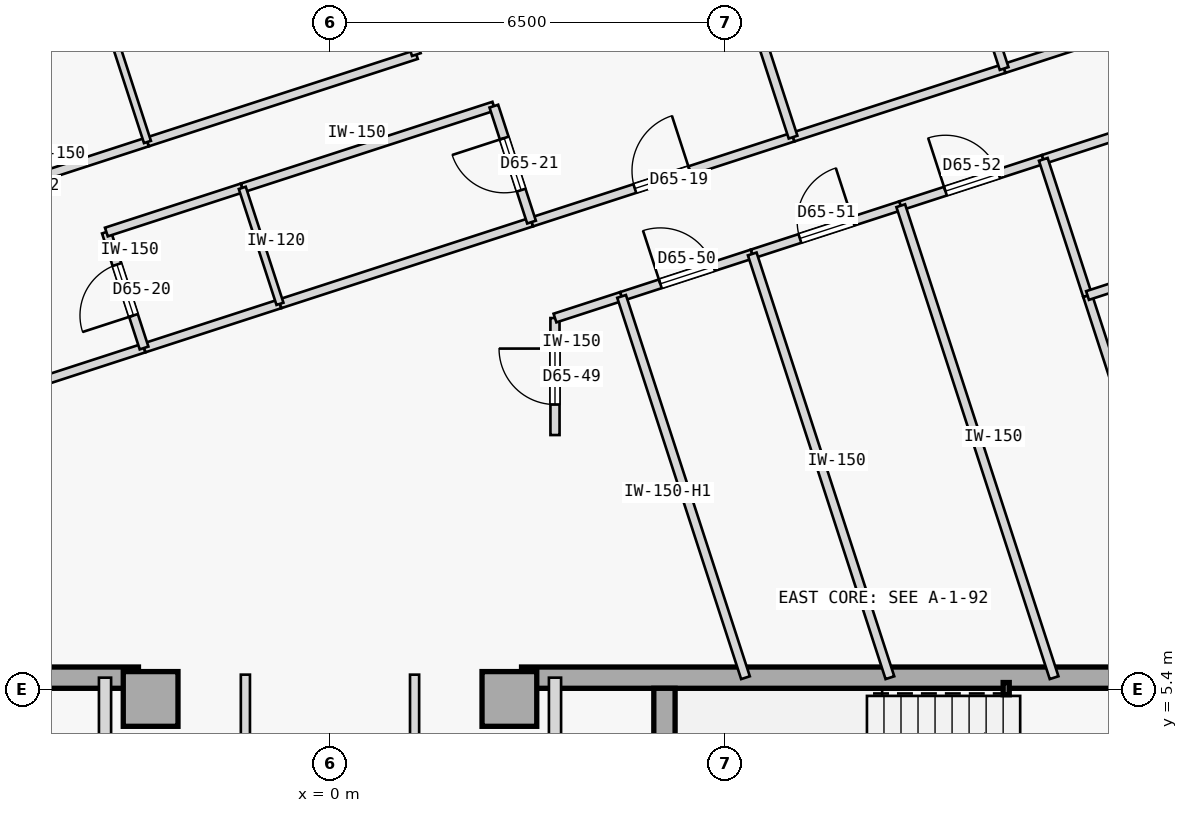
"""IFC4 building model, lengths in metres.
Left out: names, types, materials, properties, quantities, classifications, styles, units other than length and angle.
Written with IfcOpenShell. Run it as: python <this file> out.ifc"""

import sys

from ifc_helpers import new_model, si_unit, direction, frame, frame_2d, origin, origin_2d, place, context, subcontext, project, spatial, rectangle, hollow_rectangle, extrude, element, fill, save


model = new_model("IFC4")
c1 = context("Model", 3, precision=1e-05, world=origin(), true_north=direction((0.0, 1.0)))
c2 = subcontext(c1, "Body", "Model", "MODEL_VIEW")
j1 = project(units=[si_unit("LENGTHUNIT", "METRE"), si_unit("PLANEANGLEUNIT", "RADIAN")], contexts=[c1])
p1 = place(None, origin())
s1 = spatial("IfcSite", under=j1, at=p1, CompositionType="ELEMENT")
p2 = place(p1, origin())
s2 = spatial("IfcBuilding", under=s1, at=p2, CompositionType="ELEMENT")
p3 = place(p2, frame((0.0, 0.0, 244.4)))
s3 = spatial("IfcBuildingStorey", under=s2, at=p3, CompositionType="ELEMENT", Elevation=244.4)
for number, where, z_axis, x_axis in (
    (1, (-2.95, 5.25, 0.0), (0.0, 0.0, 1.0), (1.0, 0.0, 0.0)),
    (2, (2.95, 5.25, 0.0), (0.0, 0.0, 1.0), (1.0, 0.0, 0.0)),
):
    element("IfcColumn", number, at=place(p3, frame(where, z_axis=z_axis, x_axis=x_axis)), inside=s3, PredefinedType="COLUMN", context=c2, shape_type="SweptSolid", body=[
        extrude(rectangle(XDim=0.9, YDim=0.9, at=origin_2d()), origin(), (0.0, 0.0, 1.0), 3.35),
    ])
for number, where, z_axis, x_axis in (
    (3, (-14.56, 5.6, 0.0), (0.0, 0.0, 1.0), (1.0, 0.0, 0.0)),
    (4, (3.15, 5.6, 0.0), (0.0, 0.0, 1.0), (1.0, 0.0, 0.0)),
):
    element("IfcWall", number, at=place(p3, frame(where, z_axis=z_axis, x_axis=x_axis)), inside=s3, PredefinedType="SHEAR", context=c2, shape_type="SweptSolid", body=[
        extrude(rectangle(XDim=11.41, YDim=0.35, at=frame_2d((5.705, 0.0))), origin(), (0.0, 0.0, 1.0), 3.125),
    ])
p4 = place(p3, frame((5.5, 2.15, 0.0), z_axis=(0.0, 0.0, 1.0), x_axis=(0.0, 1.0, 0.0)))
e5 = element("IfcWall", 5, at=p4, inside=s3, PredefinedType="SHEAR", context=c2, shape_type="SweptSolid", body=[
    extrude(rectangle(XDim=3.275, YDim=0.35, at=frame_2d((1.638, 0.0))), origin(), (0.0, 0.0, 1.0), 3.125),
])
p5 = place(p3, frame((11.12, 5.42, 0.0), z_axis=(0.0, 0.0, 1.0), x_axis=(1.0, 0.0, 0.0)))
e6 = element("IfcColumn", 6, at=p5, inside=s3, PredefinedType="COLUMN", context=c2, shape_type="SweptSolid", body=[
    extrude(hollow_rectangle(XDim=0.1, YDim=0.2, WallThickness=0.008, at=origin_2d()), origin(), (0.0, 0.0, 1.0), 3.35),
])
p6 = place(p3, frame((-3.7, -1.15, 0.0), z_axis=(0.0, 0.0, 1.0), x_axis=(0.0, 1.0, 0.0)))
e7 = element("IfcWall", 7, at=p6, inside=s3, PredefinedType="STANDARD", context=c2, shape_type="SweptSolid", body=[
    extrude(rectangle(XDim=6.75, YDim=0.2, at=frame_2d((3.375, 0.0))), origin(), (0.0, 0.0, 1.0), 3.125),
])
p7 = place(p6, frame((3.6, 0.0, 0.0)))
e8 = element("IfcOpeningElement", 8, at=p7, cuts=e7, PredefinedType="OPENING", context=c2, shape_type="SweptSolid", body=[
    extrude(rectangle(XDim=0.92, YDim=2.15, at=frame_2d((0.46, 1.075))), frame((0.0, 0.11, 0.0), z_axis=(0.0, -1.0, 0.0), x_axis=(1.0, 0.0, 0.0)), (0.0, 0.0, 1.0), 0.22),
])
p8 = place(p6, frame((0.85, 0.0, 0.0)))
e9 = element("IfcOpeningElement", 9, at=p8, cuts=e7, PredefinedType="OPENING", context=c2, shape_type="SweptSolid", body=[
    extrude(rectangle(XDim=0.9, YDim=2.15, at=frame_2d((0.45, 1.075))), frame((0.0, 0.11, 0.0), z_axis=(0.0, -1.0, 0.0), x_axis=(1.0, 0.0, 0.0)), (0.0, 0.0, 1.0), 0.22),
])
p9 = place(p3, frame((3.7, -1.15, 0.0), z_axis=(0.0, 0.0, 1.0), x_axis=(0.0, 1.0, 0.0)))
e10 = element("IfcWall", 10, at=p9, inside=s3, PredefinedType="STANDARD", context=c2, shape_type="SweptSolid", body=[
    extrude(rectangle(XDim=6.75, YDim=0.2, at=frame_2d((3.375, 0.0))), origin(), (0.0, 0.0, 1.0), 3.125),
])
p10 = place(p9, frame((3.6, 0.0, 0.0)))
e11 = element("IfcOpeningElement", 11, at=p10, cuts=e10, PredefinedType="OPENING", context=c2, shape_type="SweptSolid", body=[
    extrude(rectangle(XDim=0.92, YDim=2.15, at=frame_2d((0.46, 1.075))), frame((0.0, 0.11, 0.0), z_axis=(0.0, -1.0, 0.0), x_axis=(1.0, 0.0, 0.0)), (0.0, 0.0, 1.0), 0.22),
])
p11 = place(p3, frame((-1.391, -5.65, 0.0), z_axis=(0.0, 0.0, 1.0), x_axis=(-8.6422954e-05, 0.999999996266, 0.0)))
e12 = element("IfcWall", 12, at=p11, inside=s3, PredefinedType="PARTITIONING", context=c2, shape_type="SweptSolid", body=[
    extrude(rectangle(XDim=11.3, YDim=0.15, at=frame_2d((5.65, 0.0))), origin(), (0.0, 0.0, 1.0), 3.125),
])
p12 = place(p11, frame((5.175, 0.0, 0.0)))
e13 = element("IfcOpeningElement", 13, at=p12, cuts=e12, PredefinedType="OPENING", context=c2, shape_type="SweptSolid", body=[
    extrude(rectangle(XDim=0.95, YDim=2.15, at=frame_2d((0.475, 1.075))), frame((0.0, 0.085, 0.0), z_axis=(0.0, -1.0, 0.0), x_axis=(1.0, 0.0, 0.0)), (0.0, 0.0, 1.0), 0.17),
])
p13 = place(p3, frame((1.391, -5.648, 0.0), z_axis=(0.0, 0.0, 1.0), x_axis=(-4.3218947e-05, 0.999999999066, 0.0)))
e14 = element("IfcWall", 14, at=p13, inside=s3, PredefinedType="PARTITIONING", context=c2, shape_type="SweptSolid", body=[
    extrude(rectangle(XDim=11.298, YDim=0.15, at=frame_2d((5.649, 0.0))), origin(), (0.0, 0.0, 1.0), 3.125),
])
p14 = place(p3, frame((-6.53, 9.894, 0.0), z_axis=(0.0, 0.0, 1.0), x_axis=(0.951057168147, 0.309014988174, 0.0)))
e15 = element("IfcWall", 15, at=p14, inside=s3, PredefinedType="PARTITIONING", context=c2, shape_type="SweptSolid", body=[
    extrude(rectangle(XDim=3.65, YDim=0.15, at=frame_2d((1.825, 0.0))), origin(), (0.0, 0.0, 1.0), 3.125),
])
p15 = place(p3, frame((3.314, 13.092, 0.0), z_axis=(0.0, 0.0, 1.0), x_axis=(0.951068976929, 0.308978641858, 0.0)))
e16 = element("IfcWall", 16, at=p15, inside=s3, PredefinedType="PARTITIONING", context=c2, shape_type="SweptSolid", body=[
    extrude(rectangle(XDim=4.522, YDim=0.15, at=frame_2d((2.261, 0.0))), origin(), (0.0, 0.0, 1.0), 3.125),
])
p16 = place(p15, frame((1.786, 0.0, 0.0)))
e17 = element("IfcOpeningElement", 17, at=p16, cuts=e16, PredefinedType="OPENING", context=c2, shape_type="SweptSolid", body=[
    extrude(rectangle(XDim=0.95, YDim=2.15, at=frame_2d((0.475, 1.075))), frame((0.0, 0.085, 0.0), z_axis=(0.0, -1.0, 0.0), x_axis=(1.0, 0.0, 0.0)), (0.0, 0.0, 1.0), 0.17),
])
p17 = place(p3, frame((-3.058, 11.021, 0.0), z_axis=(0.0, 0.0, 1.0), x_axis=(0.951045519245, 0.309050837767, 0.0)))
e18 = element("IfcWall", 18, at=p17, inside=s3, PredefinedType="PARTITIONING", context=c2, shape_type="SweptSolid", body=[
    extrude(rectangle(XDim=2.35, YDim=0.15, at=frame_2d((1.175, 0.0))), origin(), (0.0, 0.0, 1.0), 3.125),
])
p18 = place(p3, frame((-0.823, 11.748, 0.0), z_axis=(0.0, 0.0, 1.0), x_axis=(0.951052627573, 0.309028962374, 0.0)))
e19 = element("IfcWall", 19, at=p18, inside=s3, PredefinedType="PARTITIONING", context=c2, shape_type="SweptSolid", body=[
    extrude(rectangle(XDim=4.35, YDim=0.15, at=frame_2d((2.175, 0.0))), origin(), (0.0, 0.0, 1.0), 3.125),
])
p19 = place(p3, frame((7.615, 14.489, 0.0), z_axis=(0.0, 0.0, 1.0), x_axis=(0.951050780541, 0.309034646652, 0.0)))
e20 = element("IfcWall", 20, at=p19, inside=s3, PredefinedType="PARTITIONING", context=c2, shape_type="SweptSolid", body=[
    extrude(rectangle(XDim=3.65, YDim=0.15, at=frame_2d((1.825, 0.0))), origin(), (0.0, 0.0, 1.0), 3.125),
])
p20 = place(p3, frame((11.086, 15.617, 0.0), z_axis=(0.0, 0.0, 1.0), x_axis=(0.951045519245, 0.309050837767, 0.0)))
e21 = element("IfcWall", 21, at=p20, inside=s3, PredefinedType="PARTITIONING", context=c2, shape_type="SweptSolid", body=[
    extrude(rectangle(XDim=2.35, YDim=0.15, at=frame_2d((1.175, 0.0))), origin(), (0.0, 0.0, 1.0), 3.125),
])
p21 = place(p3, frame((3.7, 9.59, 0.0), z_axis=(0.0, 0.0, 1.0), x_axis=(-0.000380662325, 0.999999927548, 0.0)))
e22 = element("IfcWall", 22, at=p21, inside=s3, PredefinedType="PARTITIONING", context=c2, shape_type="SweptSolid", body=[
    extrude(rectangle(XDim=1.924, YDim=0.15, at=frame_2d((0.962, 0.0))), origin(), (0.0, 0.0, 1.0), 3.125),
])
p22 = place(p21, frame((0.502, 0.0, 0.0)))
e23 = element("IfcOpeningElement", 23, at=p22, cuts=e22, PredefinedType="OPENING", context=c2, shape_type="SweptSolid", body=[
    extrude(rectangle(XDim=0.92, YDim=2.15, at=frame_2d((0.46, 1.075))), frame((0.0, 0.085, 0.0), z_axis=(0.0, -1.0, 0.0), x_axis=(1.0, 0.0, 0.0)), (0.0, 0.0, 1.0), 0.17),
])
p23 = place(p3, frame((3.699, 11.514, 0.0), z_axis=(0.0, 0.0, 1.0), x_axis=(0.951071437281, 0.308971068529, 0.0)))
e24 = element("IfcWall", 24, at=p23, inside=s3, PredefinedType="PARTITIONING", context=c2, shape_type="SweptSolid", body=[
    extrude(rectangle(XDim=1.152, YDim=0.15, at=frame_2d((0.576, 0.0))), origin(), (0.0, 0.0, 1.0), 3.125),
])
p24 = place(p3, frame((4.795, 11.87, 0.0), z_axis=(0.0, 0.0, 1.0), x_axis=(0.951065832698, 0.308988319964, 0.0)))
e25 = element("IfcWall", 25, at=p24, inside=s3, PredefinedType="PARTITIONING", context=c2, shape_type="SweptSolid", body=[
    extrude(rectangle(XDim=2.259, YDim=0.15, at=frame_2d((1.129, 0.0))), origin(), (0.0, 0.0, 1.0), 3.125),
])
p25 = place(p24, frame((0.669, 0.0, 0.0)))
e26 = element("IfcOpeningElement", 26, at=p25, cuts=e25, PredefinedType="OPENING", context=c2, shape_type="SweptSolid", body=[
    extrude(rectangle(XDim=0.92, YDim=2.15, at=frame_2d((0.46, 1.075))), frame((0.0, 0.085, 0.0), z_axis=(0.0, -1.0, 0.0), x_axis=(1.0, 0.0, 0.0)), (0.0, 0.0, 1.0), 0.17),
])
p26 = place(p3, frame((6.944, 12.568, 0.0), z_axis=(0.0, 0.0, 1.0), x_axis=(0.951042451835, 0.309060276981, 0.0)))
e27 = element("IfcWall", 27, at=p26, inside=s3, PredefinedType="PARTITIONING", context=c2, shape_type="SweptSolid", body=[
    extrude(rectangle(XDim=2.568, YDim=0.15, at=frame_2d((1.284, 0.0))), origin(), (0.0, 0.0, 1.0), 3.125),
])
p27 = place(p26, frame((0.824, 0.0, 0.0)))
e28 = element("IfcOpeningElement", 28, at=p27, cuts=e27, PredefinedType="OPENING", context=c2, shape_type="SweptSolid", body=[
    extrude(rectangle(XDim=0.92, YDim=2.15, at=frame_2d((0.46, 1.075))), frame((0.0, 0.085, 0.0), z_axis=(0.0, -1.0, 0.0), x_axis=(1.0, 0.0, 0.0)), (0.0, 0.0, 1.0), 0.17),
])
p28 = place(p3, frame((9.386, 13.362, 0.0), z_axis=(0.0, 0.0, 1.0), x_axis=(0.951052991774, 0.309027841526, 0.0)))
e29 = element("IfcWall", 29, at=p28, inside=s3, PredefinedType="PARTITIONING", context=c2, shape_type="SweptSolid", body=[
    extrude(rectangle(XDim=2.465, YDim=0.15, at=frame_2d((1.232, 0.0))), origin(), (0.0, 0.0, 1.0), 3.125),
])
p29 = place(p28, frame((0.772, 0.0, 0.0)))
e30 = element("IfcOpeningElement", 30, at=p29, cuts=e29, PredefinedType="OPENING", context=c2, shape_type="SweptSolid", body=[
    extrude(rectangle(XDim=0.92, YDim=2.15, at=frame_2d((0.46, 1.075))), frame((0.0, 0.085, 0.0), z_axis=(0.0, -1.0, 0.0), x_axis=(1.0, 0.0, 0.0)), (0.0, 0.0, 1.0), 0.17),
])
p30 = place(p3, frame((11.73, 14.123, 0.0), z_axis=(0.0, 0.0, 1.0), x_axis=(0.951060263663, 0.309005460926, 0.0)))
e31 = element("IfcWall", 31, at=p30, inside=s3, PredefinedType="PARTITIONING", context=c2, shape_type="SweptSolid", body=[
    extrude(rectangle(XDim=12.327, YDim=0.15, at=frame_2d((6.164, 0.0))), origin(), (0.0, 0.0, 1.0), 3.125),
])
p31 = place(p30, frame((5.704, 0.0, 0.0)))
e32 = element("IfcOpeningElement", 32, at=p31, cuts=e31, PredefinedType="OPENING", context=c2, shape_type="SweptSolid", body=[
    extrude(rectangle(XDim=0.92, YDim=2.15, at=frame_2d((0.46, 1.075))), frame((0.0, 0.085, 0.0), z_axis=(0.0, -1.0, 0.0), x_axis=(1.0, 0.0, 0.0)), (0.0, 0.0, 1.0), 0.17),
])
p32 = place(p3, frame((-3.058, 11.021, 0.0), z_axis=(0.0, 0.0, 1.0), x_axis=(-0.309022749039, 0.951054646472, 0.0)))
e33 = element("IfcWall", 33, at=p32, inside=s3, PredefinedType="PARTITIONING", context=c2, shape_type="SweptSolid", body=[
    extrude(rectangle(XDim=2.005, YDim=0.15, at=frame_2d((1.002, 0.0))), origin(), (0.0, 0.0, 1.0), 3.125),
])
p33 = place(p32, frame((0.562, 0.0, 0.0)))
e34 = element("IfcOpeningElement", 34, at=p33, cuts=e33, PredefinedType="OPENING", context=c2, shape_type="SweptSolid", body=[
    extrude(rectangle(XDim=0.88, YDim=2.15, at=frame_2d((0.44, 1.075))), frame((0.0, 0.085, 0.0), z_axis=(0.0, -1.0, 0.0), x_axis=(1.0, 0.0, 0.0)), (0.0, 0.0, 1.0), 0.17),
])
p34 = place(p3, frame((-3.678, 12.928, 0.0), z_axis=(0.0, 0.0, 1.0), x_axis=(0.951076048914, 0.308956872689, 0.0)))
e35 = element("IfcWall", 35, at=p34, inside=s3, PredefinedType="PARTITIONING", context=c2, shape_type="SweptSolid", body=[
    extrude(rectangle(XDim=2.35, YDim=0.15, at=frame_2d((1.175, 0.0))), origin(), (0.0, 0.0, 1.0), 3.125),
])
p35 = place(p3, frame((-1.443, 13.655, 0.0), z_axis=(0.0, 0.0, 1.0), x_axis=(0.951052627573, 0.309028962374, 0.0)))
e36 = element("IfcWall", 36, at=p35, inside=s3, PredefinedType="PARTITIONING", context=c2, shape_type="SweptSolid", body=[
    extrude(rectangle(XDim=4.35, YDim=0.15, at=frame_2d((2.175, 0.0))), origin(), (0.0, 0.0, 1.0), 3.125),
])
p36 = place(p3, frame((3.314, 13.092, 0.0), z_axis=(0.0, 0.0, 1.0), x_axis=(-0.309058537449, 0.951043017129, 0.0)))
e37 = element("IfcWall", 37, at=p36, inside=s3, PredefinedType="PARTITIONING", context=c2, shape_type="SweptSolid", body=[
    extrude(rectangle(XDim=2.005, YDim=0.15, at=frame_2d((1.002, 0.0))), origin(), (0.0, 0.0, 1.0), 3.125),
])
p37 = place(p36, frame((0.552, 0.0, 0.0)))
e38 = element("IfcOpeningElement", 38, at=p37, cuts=e37, PredefinedType="OPENING", context=c2, shape_type="SweptSolid", body=[
    extrude(rectangle(XDim=0.9, YDim=2.15, at=frame_2d((0.45, 1.075))), frame((0.0, 0.085, 0.0), z_axis=(0.0, -1.0, 0.0), x_axis=(1.0, 0.0, 0.0)), (0.0, 0.0, 1.0), 0.17),
])
p38 = place(p3, frame((-7.425, 12.973, 0.0), z_axis=(0.0, 0.0, 1.0), x_axis=(0.951055286502, 0.309020779263, 0.0)))
e39 = element("IfcWall", 39, at=p38, inside=s3, PredefinedType="PARTITIONING", context=c2, shape_type="SweptSolid", body=[
    extrude(rectangle(XDim=4.65, YDim=0.15, at=frame_2d((2.325, 0.0))), origin(), (0.0, 0.0, 1.0), 3.125),
])
p39 = place(p38, frame((1.875, 0.0, 0.0)))
e40 = element("IfcOpeningElement", 40, at=p39, cuts=e39, PredefinedType="OPENING", context=c2, shape_type="SweptSolid", body=[
    extrude(rectangle(XDim=0.9, YDim=2.15, at=frame_2d((0.45, 1.075))), frame((0.0, 0.085, 0.0), z_axis=(0.0, -1.0, 0.0), x_axis=(1.0, 0.0, 0.0)), (0.0, 0.0, 1.0), 0.17),
])
p40 = place(p3, frame((-3.002, 14.41, 0.0), z_axis=(0.0, 0.0, 1.0), x_axis=(0.951065702951, 0.308988719326, 0.0)))
e41 = element("IfcWall", 41, at=p40, inside=s3, PredefinedType="PARTITIONING", context=c2, shape_type="SweptSolid", body=[
    extrude(rectangle(XDim=4.65, YDim=0.15, at=frame_2d((2.325, 0.0))), origin(), (0.0, 0.0, 1.0), 3.125),
])
p41 = place(p3, frame((1.42, 15.846, 0.0), z_axis=(0.0, 0.0, 1.0), x_axis=(-0.309018403393, 0.951056058476, 0.0)))
e42 = element("IfcWall", 42, at=p41, inside=s3, PredefinedType="PARTITIONING", context=c2, shape_type="SweptSolid", body=[
    extrude(rectangle(XDim=4.079, YDim=0.15, at=frame_2d((2.04, 0.0))), origin(), (0.0, 0.0, 1.0), 3.125),
])
p42 = place(p41, frame((0.978, 0.0, 0.0)))
e43 = element("IfcOpeningElement", 43, at=p42, cuts=e42, PredefinedType="OPENING", context=c2, shape_type="SweptSolid", body=[
    extrude(rectangle(XDim=0.9, YDim=2.15, at=frame_2d((0.45, 1.075))), frame((0.0, 0.085, 0.0), z_axis=(0.0, -1.0, 0.0), x_axis=(1.0, 0.0, 0.0)), (0.0, 0.0, 1.0), 0.17),
])
p43 = place(p3, frame((7.615, 14.489, 0.0), z_axis=(0.0, 0.0, 1.0), x_axis=(-0.309029230739, 0.951052540372, 0.0)))
e44 = element("IfcWall", 44, at=p43, inside=s3, PredefinedType="PARTITIONING", context=c2, shape_type="SweptSolid", body=[
    extrude(rectangle(XDim=7.284, YDim=0.15, at=frame_2d((3.642, 0.0))), origin(), (0.0, 0.0, 1.0), 3.125),
])
p44 = place(p3, frame((-0.823, 11.748, 0.0), z_axis=(0.0, 0.0, 1.0), x_axis=(-0.309058537449, 0.951043017129, 0.0)))
e45 = element("IfcWall", 45, at=p44, inside=s3, PredefinedType="PARTITIONING", context=c2, shape_type="SweptSolid", body=[
    extrude(rectangle(XDim=2.005, YDim=0.12, at=frame_2d((1.002, 0.0))), origin(), (0.0, 0.0, 1.0), 3.125),
])
p45 = place(p3, frame((-3.002, 14.41, 0.0), z_axis=(0.0, 0.0, 1.0), x_axis=(-0.309018403393, 0.951056058476, 0.0)))
e46 = element("IfcWall", 46, at=p45, inside=s3, PredefinedType="PARTITIONING", context=c2, shape_type="SweptSolid", body=[
    extrude(rectangle(XDim=4.079, YDim=0.12, at=frame_2d((2.04, 0.0))), origin(), (0.0, 0.0, 1.0), 3.125),
])
p46 = place(p3, frame((11.086, 15.617, 0.0), z_axis=(0.0, 0.0, 1.0), x_axis=(-0.309022749039, 0.951054646472, 0.0)))
e47 = element("IfcWall", 47, at=p46, inside=s3, PredefinedType="PARTITIONING", context=c2, shape_type="SweptSolid", body=[
    extrude(rectangle(XDim=2.005, YDim=0.15, at=frame_2d((1.002, 0.0))), origin(), (0.0, 0.0, 1.0), 3.125),
])
p47 = place(p46, frame((0.562, 0.0, 0.0)))
e48 = element("IfcOpeningElement", 48, at=p47, cuts=e47, PredefinedType="OPENING", context=c2, shape_type="SweptSolid", body=[
    extrude(rectangle(XDim=0.88, YDim=2.15, at=frame_2d((0.44, 1.075))), frame((0.0, 0.085, 0.0), z_axis=(0.0, -1.0, 0.0), x_axis=(1.0, 0.0, 0.0)), (0.0, 0.0, 1.0), 0.17),
])
p48 = place(p3, frame((6.833, 5.6, 0.0), z_axis=(0.0, 0.0, 1.0), x_axis=(-0.309019923183, 0.951055564663, 0.0)))
e49 = element("IfcWall", 49, at=p48, inside=s3, PredefinedType="PARTITIONING", context=c2, shape_type="SweptSolid", body=[
    extrude(rectangle(XDim=6.593, YDim=0.15, at=frame_2d((3.296, 0.0))), origin(), (0.0, 0.0, 1.0), 2.675),
])
p49 = place(p3, frame((9.208, 5.6, 0.0), z_axis=(0.0, 0.0, 1.0), x_axis=(-0.309021275068, 0.951055125403, 0.0)))
e50 = element("IfcWall", 50, at=p49, inside=s3, PredefinedType="PARTITIONING", context=c2, shape_type="SweptSolid", body=[
    extrude(rectangle(XDim=7.327, YDim=0.15, at=frame_2d((3.664, 0.0))), origin(), (0.0, 0.0, 1.0), 3.125),
])
p50 = place(p3, frame((11.908, 5.6, 0.0), z_axis=(0.0, 0.0, 1.0), x_axis=(-0.308994076163, 0.951063962568, 0.0)))
e51 = element("IfcWall", 51, at=p50, inside=s3, PredefinedType="PARTITIONING", context=c2, shape_type="SweptSolid", body=[
    extrude(rectangle(XDim=8.161, YDim=0.15, at=frame_2d((4.081, 0.0))), origin(), (0.0, 0.0, 1.0), 3.125),
])
p51 = place(p3, frame((13.488, 8.714, 0.0), z_axis=(0.0, 0.0, 1.0), x_axis=(-0.308946982245, 0.951079261766, 0.0)))
e52 = element("IfcWall", 52, at=p51, inside=s3, PredefinedType="PARTITIONING", context=c2, shape_type="SweptSolid", body=[
    extrude(rectangle(XDim=3.334, YDim=0.15, at=frame_2d((1.667, 0.0))), origin(), (0.0, 0.0, 1.0), 3.125),
])
p52 = place(p3, frame((12.458, 11.885, 0.0), z_axis=(0.0, 0.0, 1.0), x_axis=(-0.309062621189, 0.951041690035, 0.0)))
e53 = element("IfcWall", 53, at=p52, inside=s3, PredefinedType="PARTITIONING", context=c2, shape_type="SweptSolid", body=[
    extrude(rectangle(XDim=2.354, YDim=0.15, at=frame_2d((1.177, 0.0))), origin(), (0.0, 0.0, 1.0), 3.125),
])
p53 = place(p3, frame((12.458, 11.885, 0.0), z_axis=(0.0, 0.0, 1.0), x_axis=(0.951060263663, 0.309005460926, 0.0)))
e54 = element("IfcWall", 54, at=p53, inside=s3, PredefinedType="PARTITIONING", context=c2, shape_type="SweptSolid", body=[
    extrude(rectangle(XDim=12.327, YDim=0.15, at=frame_2d((6.164, 0.0))), origin(), (0.0, 0.0, 1.0), 3.125),
])
p54 = place(p16, origin())
e55 = element("IfcDoor", 55, at=p54, inside=s3, OperationType="SINGLE_SWING_RIGHT", PredefinedType="DOOR", context=c2, shape_type="SweptSolid", body=[
    extrude(rectangle(XDim=0.95, YDim=2.15, at=frame_2d((0.475, 1.075))), frame((0.0, 0.025, 0.0), z_axis=(0.0, -1.0, 0.0), x_axis=(1.0, 0.0, 0.0)), (0.0, 0.0, 1.0), 0.05),
])
fill(e17, e55)
p55 = place(p33, origin())
e56 = element("IfcDoor", 56, at=p55, inside=s3, OperationType="SINGLE_SWING_LEFT", PredefinedType="DOOR", context=c2, shape_type="SweptSolid", body=[
    extrude(rectangle(XDim=0.88, YDim=2.15, at=frame_2d((0.44, 1.075))), frame((0.0, 0.025, 0.0), z_axis=(0.0, -1.0, 0.0), x_axis=(1.0, 0.0, 0.0)), (0.0, 0.0, 1.0), 0.05),
])
fill(e34, e56)
p56 = place(p37, origin())
e57 = element("IfcDoor", 57, at=p56, inside=s3, OperationType="SINGLE_SWING_RIGHT", PredefinedType="DOOR", context=c2, shape_type="SweptSolid", body=[
    extrude(rectangle(XDim=0.9, YDim=2.15, at=frame_2d((0.45, 1.075))), frame((0.0, 0.025, 0.0), z_axis=(0.0, -1.0, 0.0), x_axis=(1.0, 0.0, 0.0)), (0.0, 0.0, 1.0), 0.05),
])
fill(e38, e57)
p57 = place(p22, origin())
e58 = element("IfcDoor", 58, at=p57, inside=s3, OperationType="SINGLE_SWING_RIGHT", PredefinedType="DOOR", context=c2, shape_type="SweptSolid", body=[
    extrude(rectangle(XDim=0.92, YDim=2.15, at=frame_2d((0.46, 1.075))), frame((0.0, 0.025, 0.0), z_axis=(0.0, -1.0, 0.0), x_axis=(1.0, 0.0, 0.0)), (0.0, 0.0, 1.0), 0.05),
])
fill(e23, e58)
p58 = place(p25, origin())
e59 = element("IfcDoor", 59, at=p58, inside=s3, OperationType="SINGLE_SWING_LEFT", PredefinedType="DOOR", context=c2, shape_type="SweptSolid", body=[
    extrude(rectangle(XDim=0.92, YDim=2.15, at=frame_2d((0.46, 1.075))), frame((0.0, 0.025, 0.0), z_axis=(0.0, -1.0, 0.0), x_axis=(1.0, 0.0, 0.0)), (0.0, 0.0, 1.0), 0.05),
])
fill(e26, e59)
p59 = place(p27, origin())
e60 = element("IfcDoor", 60, at=p59, inside=s3, OperationType="SINGLE_SWING_RIGHT", PredefinedType="DOOR", context=c2, shape_type="SweptSolid", body=[
    extrude(rectangle(XDim=0.92, YDim=2.15, at=frame_2d((0.46, 1.075))), frame((0.0, 0.025, 0.0), z_axis=(0.0, -1.0, 0.0), x_axis=(1.0, 0.0, 0.0)), (0.0, 0.0, 1.0), 0.05),
])
fill(e28, e60)
p60 = place(p29, origin())
e61 = element("IfcDoor", 61, at=p60, inside=s3, OperationType="SINGLE_SWING_LEFT", PredefinedType="DOOR", context=c2, shape_type="SweptSolid", body=[
    extrude(rectangle(XDim=0.92, YDim=2.15, at=frame_2d((0.46, 1.075))), frame((0.0, 0.025, 0.0), z_axis=(0.0, -1.0, 0.0), x_axis=(1.0, 0.0, 0.0)), (0.0, 0.0, 1.0), 0.05),
])
fill(e30, e61)
save(model, sys.argv[1])
